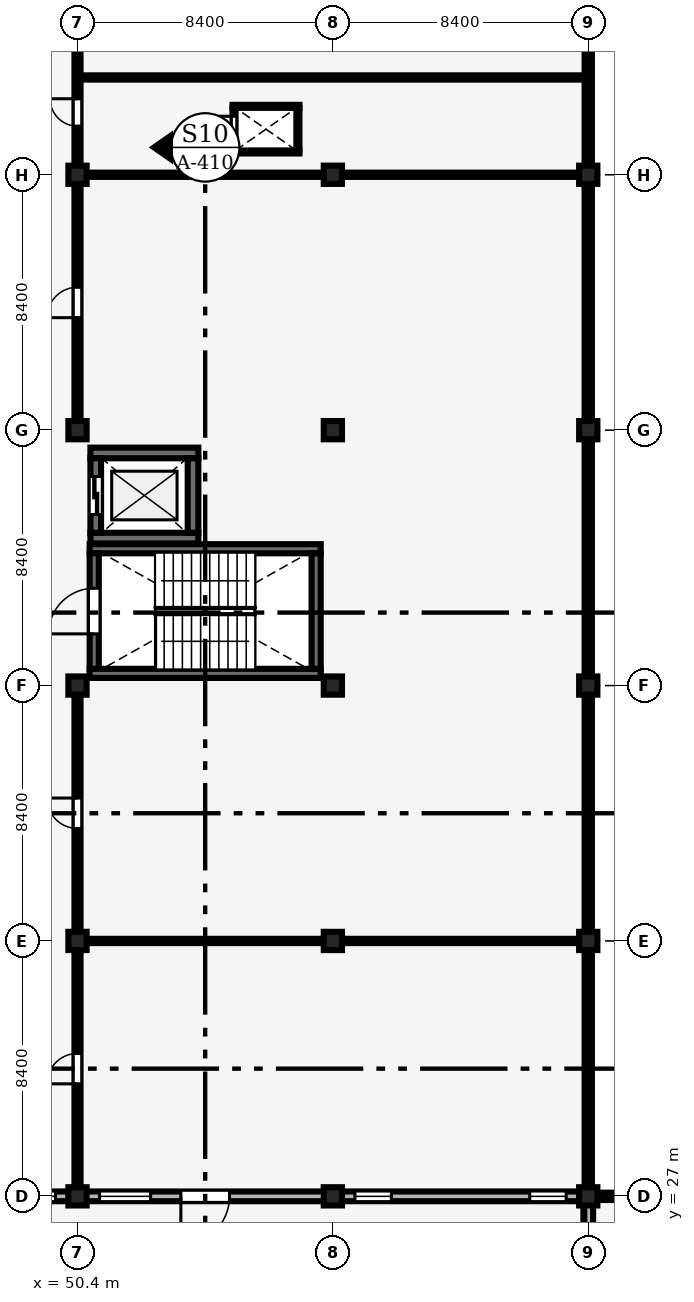
"""IFC4 building model, lengths in metres.
Left out: names, types, materials, properties, quantities, classifications, styles, units other than length and angle.
Written with IfcOpenShell. Run it as: python <this file> out.ifc"""

import sys

from ifc_helpers import new_model, si_unit, direction, frame, frame_2d, origin, origin_2d, place, context, subcontext, project, spatial, rectangle, extrude, element, fill, save


model = new_model("IFC4")
c1 = context("Model", 3, precision=1e-05, world=origin(), true_north=direction((0.0, 1.0)))
c2 = subcontext(c1, "Body", "Model", "MODEL_VIEW")
j1 = project(units=[si_unit("LENGTHUNIT", "METRE"), si_unit("PLANEANGLEUNIT", "RADIAN")], contexts=[c1])
p1 = place(None, origin())
s1 = spatial("IfcSite", under=j1, at=p1, CompositionType="ELEMENT")
p2 = place(p1, origin())
s2 = spatial("IfcBuilding", under=s1, at=p2, CompositionType="ELEMENT")
p3 = place(p2, frame((0.0, 0.0, 4.8)))
s3 = spatial("IfcBuildingStorey", under=s2, at=p3, CompositionType="ELEMENT", Elevation=4.8)
for number, where, z_axis, x_axis in (
    (1, (50.4, 27.0, 0.0), (0.0, 0.0, 1.0), (1.0, 0.0, 0.0)),
    (2, (50.4, 35.4, 0.0), (0.0, 0.0, 1.0), (1.0, 0.0, 0.0)),
    (3, (50.4, 43.8, 0.0), (0.0, 0.0, 1.0), (1.0, 0.0, 0.0)),
    (4, (50.4, 52.2, 0.0), (0.0, 0.0, 1.0), (1.0, 0.0, 0.0)),
    (5, (50.4, 60.6, 0.0), (0.0, 0.0, 1.0), (1.0, 0.0, 0.0)),
    (6, (58.8, 27.0, 0.0), (0.0, 0.0, 1.0), (1.0, 0.0, 0.0)),
    (7, (58.8, 35.4, 0.0), (0.0, 0.0, 1.0), (1.0, 0.0, 0.0)),
    (8, (58.8, 43.8, 0.0), (0.0, 0.0, 1.0), (1.0, 0.0, 0.0)),
    (9, (58.8, 52.2, 0.0), (0.0, 0.0, 1.0), (1.0, 0.0, 0.0)),
    (10, (58.8, 60.6, 0.0), (0.0, 0.0, 1.0), (1.0, 0.0, 0.0)),
    (11, (67.2, 27.0, 0.0), (0.0, 0.0, 1.0), (1.0, 0.0, 0.0)),
    (12, (67.2, 35.4, 0.0), (0.0, 0.0, 1.0), (1.0, 0.0, 0.0)),
    (13, (67.2, 43.8, 0.0), (0.0, 0.0, 1.0), (1.0, 0.0, 0.0)),
    (14, (67.2, 52.2, 0.0), (0.0, 0.0, 1.0), (1.0, 0.0, 0.0)),
    (15, (67.2, 60.6, 0.0), (0.0, 0.0, 1.0), (1.0, 0.0, 0.0)),
):
    element("IfcColumn", number, at=place(p3, frame(where, z_axis=z_axis, x_axis=x_axis)), inside=s3, PredefinedType="COLUMN", context=c2, shape_type="SweptSolid", body=[
        extrude(rectangle(XDim=0.6, YDim=0.6, at=origin_2d()), origin(), (0.0, 0.0, 1.0), 4.2),
    ])
p4 = place(p3, frame((42.275, 27.0, 0.0), z_axis=(0.0, 0.0, 1.0), x_axis=(1.0, 0.0, 0.0)))
e16 = element("IfcWall", 16, at=p4, inside=s3, PredefinedType="SOLIDWALL", context=c2, shape_type="SweptSolid", body=[
    extrude(rectangle(XDim=7.85, YDim=0.32, at=frame_2d((3.925, 0.0))), origin(), (0.0, 0.0, 1.0), 3.13),
])
p5 = place(p4, frame((0.45, 0.0, 0.9)))
e17 = element("IfcOpeningElement", 17, at=p5, cuts=e16, PredefinedType="OPENING", context=c2, shape_type="SweptSolid", body=[
    extrude(rectangle(XDim=1.2, YDim=1.5, at=frame_2d((0.6, 0.75))), frame((0.0, 0.17, 0.0), z_axis=(0.0, -1.0, 0.0), x_axis=(1.0, 0.0, 0.0)), (0.0, 0.0, 1.0), 0.34),
])
p6 = place(p4, frame((6.2, 0.0, 0.9)))
e18 = element("IfcOpeningElement", 18, at=p6, cuts=e16, PredefinedType="OPENING", context=c2, shape_type="SweptSolid", body=[
    extrude(rectangle(XDim=1.2, YDim=1.8, at=frame_2d((0.6, 0.9))), frame((0.0, 0.17, 0.0), z_axis=(0.0, -1.0, 0.0), x_axis=(1.0, 0.0, 0.0)), (0.0, 0.0, 1.0), 0.34),
])
p7 = place(p3, frame((50.675, 27.0, 0.0), z_axis=(0.0, 0.0, 1.0), x_axis=(1.0, 0.0, 0.0)))
e19 = element("IfcWall", 19, at=p7, inside=s3, PredefinedType="SOLIDWALL", context=c2, shape_type="SweptSolid", body=[
    extrude(rectangle(XDim=7.85, YDim=0.32, at=frame_2d((3.925, 0.0))), origin(), (0.0, 0.0, 1.0), 3.08),
])
p8 = place(p7, frame((4.725, 0.0, 0.0), z_axis=(0.0, 0.0, 1.0), x_axis=(-1.0, 0.0, 0.0)))
e20 = element("IfcOpeningElement", 20, at=p8, cuts=e19, PredefinedType="OPENING", context=c2, shape_type="SweptSolid", body=[
    extrude(rectangle(XDim=1.6, YDim=2.3, at=frame_2d((0.8, 1.15))), frame((0.0, 0.17, 0.0), z_axis=(0.0, -1.0, 0.0), x_axis=(1.0, 0.0, 0.0)), (0.0, 0.0, 1.0), 0.34),
])
p9 = place(p7, frame((0.45, 0.0, 0.95)))
e21 = element("IfcOpeningElement", 21, at=p9, cuts=e19, PredefinedType="OPENING", context=c2, shape_type="SweptSolid", body=[
    extrude(rectangle(XDim=1.68, YDim=1.8, at=frame_2d((0.84, 0.9))), frame((0.0, 0.17, 0.0), z_axis=(0.0, -1.0, 0.0), x_axis=(1.0, 0.0, 0.0)), (0.0, 0.0, 1.0), 0.34),
])
p10 = place(p3, frame((59.075, 27.0, 0.0), z_axis=(0.0, 0.0, 1.0), x_axis=(1.0, 0.0, 0.0)))
e22 = element("IfcWall", 22, at=p10, inside=s3, PredefinedType="SOLIDWALL", context=c2, shape_type="SweptSolid", body=[
    extrude(rectangle(XDim=7.85, YDim=0.32, at=frame_2d((3.925, 0.0))), origin(), (0.0, 0.0, 1.0), 3.13),
])
p11 = place(p10, frame((0.45, 0.0, 0.9)))
e23 = element("IfcOpeningElement", 23, at=p11, cuts=e22, PredefinedType="OPENING", context=c2, shape_type="SweptSolid", body=[
    extrude(rectangle(XDim=1.2, YDim=1.5, at=frame_2d((0.6, 0.75))), frame((0.0, 0.17, 0.0), z_axis=(0.0, -1.0, 0.0), x_axis=(1.0, 0.0, 0.0)), (0.0, 0.0, 1.0), 0.34),
])
p12 = place(p10, frame((6.2, 0.0, 0.9)))
e24 = element("IfcOpeningElement", 24, at=p12, cuts=e22, PredefinedType="OPENING", context=c2, shape_type="SweptSolid", body=[
    extrude(rectangle(XDim=1.2, YDim=1.8, at=frame_2d((0.6, 0.9))), frame((0.0, 0.17, 0.0), z_axis=(0.0, -1.0, 0.0), x_axis=(1.0, 0.0, 0.0)), (0.0, 0.0, 1.0), 0.34),
])
p13 = place(p3, frame((67.2, 18.275, 0.0), z_axis=(0.0, 0.0, 1.0), x_axis=(0.0, 1.0, 0.0)))
e25 = element("IfcWall", 25, at=p13, inside=s3, PredefinedType="SOLIDWALL", context=c2, shape_type="SweptSolid", body=[
    extrude(rectangle(XDim=8.45, YDim=0.32, at=frame_2d((4.225, 0.0))), origin(), (0.0, 0.0, 1.0), 3.43),
])
p14 = place(p13, frame((3.025, 0.0, 0.9)))
e26 = element("IfcOpeningElement", 26, at=p14, cuts=e25, PredefinedType="OPENING", context=c2, shape_type="SweptSolid", body=[
    extrude(rectangle(XDim=2.4, YDim=1.8, at=frame_2d((1.2, 0.9))), frame((0.0, 0.17, 0.0), z_axis=(0.0, -1.0, 0.0), x_axis=(1.0, 0.0, 0.0)), (0.0, 0.0, 1.0), 0.34),
])
p15 = place(p3, frame((67.2, 27.275, 0.0), z_axis=(0.0, 0.0, 1.0), x_axis=(0.0, 1.0, 0.0)))
e27 = element("IfcWall", 27, at=p15, inside=s3, PredefinedType="SOLIDWALL", context=c2, shape_type="SweptSolid", body=[
    extrude(rectangle(XDim=7.85, YDim=0.24, at=frame_2d((3.925, 0.0))), origin(), (0.0, 0.0, 1.0), 1.15),
])
p16 = place(p3, frame((67.2, 35.675, 0.0), z_axis=(0.0, 0.0, 1.0), x_axis=(0.0, 1.0, 0.0)))
e28 = element("IfcWall", 28, at=p16, inside=s3, PredefinedType="SOLIDWALL", context=c2, shape_type="SweptSolid", body=[
    extrude(rectangle(XDim=7.85, YDim=0.24, at=frame_2d((3.925, 0.0))), origin(), (0.0, 0.0, 1.0), 1.15),
])
p17 = place(p3, frame((67.2, 44.075, 0.0), z_axis=(0.0, 0.0, 1.0), x_axis=(0.0, 1.0, 0.0)))
e29 = element("IfcWall", 29, at=p17, inside=s3, PredefinedType="SOLIDWALL", context=c2, shape_type="SweptSolid", body=[
    extrude(rectangle(XDim=7.85, YDim=0.24, at=frame_2d((3.925, 0.0))), origin(), (0.0, 0.0, 1.0), 1.15),
])
p18 = place(p3, frame((67.2, 52.475, 0.0), z_axis=(0.0, 0.0, 1.0), x_axis=(0.0, 1.0, 0.0)))
e30 = element("IfcWall", 30, at=p18, inside=s3, PredefinedType="SOLIDWALL", context=c2, shape_type="SweptSolid", body=[
    extrude(rectangle(XDim=7.85, YDim=0.24, at=frame_2d((3.925, 0.0))), origin(), (0.0, 0.0, 1.0), 1.15),
])
p19 = place(p3, frame((67.2, 60.875, 0.0), z_axis=(0.0, 0.0, 1.0), x_axis=(0.0, 1.0, 0.0)))
e31 = element("IfcWall", 31, at=p19, inside=s3, PredefinedType="SOLIDWALL", context=c2, shape_type="SweptSolid", body=[
    extrude(rectangle(XDim=7.85, YDim=0.24, at=frame_2d((3.925, 0.0))), origin(), (0.0, 0.0, 1.0), 1.15),
])
p20 = place(p3, frame((67.475, 27.0, 0.0), z_axis=(0.0, 0.0, 1.0), x_axis=(1.0, 0.0, 0.0)))
e32 = element("IfcWall", 32, at=p20, inside=s3, PredefinedType="SOLIDWALL", context=c2, shape_type="SweptSolid", body=[
    extrude(rectangle(XDim=7.921, YDim=0.24, at=frame_2d((3.961, 0.0))), origin(), (0.0, 0.0, 1.0), 1.1),
])
for number, where, z_axis, x_axis in (
    (33, (50.8, 44.2, 0.0), (0.0, 0.0, 1.0), (1.0, 0.0, 0.0)),
    (34, (50.8, 48.3, 0.0), (0.0, 0.0, 1.0), (1.0, 0.0, 0.0)),
):
    element("IfcWall", number, at=place(p3, frame(where, z_axis=z_axis, x_axis=x_axis)), inside=s3, PredefinedType="SHEAR", context=c2, shape_type="SweptSolid", body=[
        extrude(rectangle(XDim=7.6, YDim=0.3, at=frame_2d((3.8, 0.0))), origin(), (0.0, 0.0, 1.0), 4.025),
    ])
p21 = place(p3, frame((50.95, 44.35, 0.0), z_axis=(0.0, 0.0, 1.0), x_axis=(0.0, 1.0, 0.0)))
e35 = element("IfcWall", 35, at=p21, inside=s3, PredefinedType="SHEAR", context=c2, shape_type="SweptSolid", body=[
    extrude(rectangle(XDim=3.8, YDim=0.3, at=frame_2d((1.9, 0.0))), origin(), (0.0, 0.0, 1.0), 4.025),
])
p22 = place(p21, frame((1.15, 0.0, 0.0)))
e36 = element("IfcOpeningElement", 36, at=p22, cuts=e35, PredefinedType="OPENING", context=c2, shape_type="SweptSolid", body=[
    extrude(rectangle(XDim=1.5, YDim=2.2, at=frame_2d((0.75, 1.1))), frame((0.0, 0.16, 0.0), z_axis=(0.0, -1.0, 0.0), x_axis=(1.0, 0.0, 0.0)), (0.0, 0.0, 1.0), 0.32),
])
p23 = place(p3, frame((58.25, 44.35, 0.0), z_axis=(0.0, 0.0, 1.0), x_axis=(0.0, 1.0, 0.0)))
e37 = element("IfcWall", 37, at=p23, inside=s3, PredefinedType="SHEAR", context=c2, shape_type="SweptSolid", body=[
    extrude(rectangle(XDim=3.8, YDim=0.3, at=frame_2d((1.9, 0.0))), origin(), (0.0, 0.0, 1.0), 4.025),
])
for number, where, z_axis, x_axis in (
    (38, (50.825, 48.65, 0.0), (0.0, 0.0, 1.0), (1.0, 0.0, 0.0)),
    (39, (50.825, 51.45, 0.0), (0.0, 0.0, 1.0), (1.0, 0.0, 0.0)),
):
    element("IfcWall", number, at=place(p3, frame(where, z_axis=z_axis, x_axis=x_axis)), inside=s3, PredefinedType="SHEAR", context=c2, shape_type="SweptSolid", body=[
        extrude(rectangle(XDim=3.55, YDim=0.35, at=frame_2d((1.775, 0.0))), origin(), (0.0, 0.0, 1.0), 3.92),
    ])
p24 = place(p3, frame((51.0, 48.825, 0.0), z_axis=(0.0, 0.0, 1.0), x_axis=(0.0, 1.0, 0.0)))
e40 = element("IfcWall", 40, at=p24, inside=s3, PredefinedType="SHEAR", context=c2, shape_type="SweptSolid", body=[
    extrude(rectangle(XDim=2.45, YDim=0.35, at=frame_2d((1.225, 0.0))), origin(), (0.0, 0.0, 1.0), 3.92),
])
p25 = place(p24, frame((0.6, 0.0, 0.0)))
e41 = element("IfcOpeningElement", 41, at=p25, cuts=e40, PredefinedType="OPENING", context=c2, shape_type="SweptSolid", body=[
    extrude(rectangle(XDim=1.25, YDim=2.25, at=frame_2d((0.625, 1.125))), frame((0.0, 0.185, 0.0), z_axis=(0.0, -1.0, 0.0), x_axis=(1.0, 0.0, 0.0)), (0.0, 0.0, 1.0), 0.37),
])
p26 = place(p3, frame((54.2, 48.825, 0.0), z_axis=(0.0, 0.0, 1.0), x_axis=(0.0, 1.0, 0.0)))
e42 = element("IfcWall", 42, at=p26, inside=s3, PredefinedType="SHEAR", context=c2, shape_type="SweptSolid", body=[
    extrude(rectangle(XDim=2.45, YDim=0.35, at=frame_2d((1.225, 0.0))), origin(), (0.0, 0.0, 1.0), 3.92),
])
for number, where, z_axis, x_axis in (
    (43, (55.5, 61.35, 0.0), (0.0, 0.0, 1.0), (1.0, 0.0, 0.0)),
    (44, (55.5, 62.85, 0.0), (0.0, 0.0, 1.0), (1.0, 0.0, 0.0)),
):
    element("IfcWall", number, at=place(p3, frame(where, z_axis=z_axis, x_axis=x_axis)), inside=s3, PredefinedType="PARTITIONING", context=c2, shape_type="SweptSolid", body=[
        extrude(rectangle(XDim=2.2, YDim=0.1, at=frame_2d((1.1, 0.0))), origin(), (0.0, 0.0, 1.0), 3.9),
    ])
p27 = place(p3, frame((55.55, 61.4, 0.0), z_axis=(0.0, 0.0, 1.0), x_axis=(0.0, 1.0, 0.0)))
e45 = element("IfcWall", 45, at=p27, inside=s3, PredefinedType="PARTITIONING", context=c2, shape_type="SweptSolid", body=[
    extrude(rectangle(XDim=1.4, YDim=0.1, at=frame_2d((0.7, 0.0))), origin(), (0.0, 0.0, 1.0), 3.9),
])
p28 = place(p27, frame((0.275, 0.0, 0.0)))
e46 = element("IfcOpeningElement", 46, at=p28, cuts=e45, PredefinedType="OPENING", context=c2, shape_type="SweptSolid", body=[
    extrude(rectangle(XDim=0.85, YDim=2.05, at=frame_2d((0.425, 1.025))), frame((0.0, 0.06, 0.0), z_axis=(0.0, -1.0, 0.0), x_axis=(1.0, 0.0, 0.0)), (0.0, 0.0, 1.0), 0.12),
])
p29 = place(p3, frame((57.65, 61.4, 0.0), z_axis=(0.0, 0.0, 1.0), x_axis=(0.0, 1.0, 0.0)))
e47 = element("IfcWall", 47, at=p29, inside=s3, PredefinedType="PARTITIONING", context=c2, shape_type="SweptSolid", body=[
    extrude(rectangle(XDim=1.4, YDim=0.1, at=frame_2d((0.7, 0.0))), origin(), (0.0, 0.0, 1.0), 3.9),
])
p30 = place(p3, frame((50.505, 35.4, 0.0), z_axis=(0.0, 0.0, 1.0), x_axis=(1.0, 0.0, 0.0)))
e48 = element("IfcWall", 48, at=p30, inside=s3, PredefinedType="PARTITIONING", context=c2, shape_type="SweptSolid", body=[
    extrude(rectangle(XDim=7.985, YDim=0.14, at=frame_2d((3.993, 0.0))), origin(), (0.0, 0.0, 1.0), 3.18),
])
p31 = place(p3, frame((59.11, 35.4, 0.0), z_axis=(0.0, 0.0, 1.0), x_axis=(1.0, 0.0, 0.0)))
e49 = element("IfcWall", 49, at=p31, inside=s3, PredefinedType="PARTITIONING", context=c2, shape_type="SweptSolid", body=[
    extrude(rectangle(XDim=7.965, YDim=0.14, at=frame_2d((3.982, 0.0))), origin(), (0.0, 0.0, 1.0), 3.23),
])
p32 = place(p3, frame((50.4, 27.165, 0.0), z_axis=(0.0, 0.0, 1.0), x_axis=(0.0, 1.0, 0.0)))
e50 = element("IfcWall", 50, at=p32, inside=s3, PredefinedType="PARTITIONING", context=c2, shape_type="SweptSolid", body=[
    extrude(rectangle(XDim=7.925, YDim=0.2, at=frame_2d((3.962, 0.0))), origin(), (0.0, 0.0, 1.0), 3.03),
])
p33 = place(p32, frame((3.535, 0.0, 0.0)))
e51 = element("IfcOpeningElement", 51, at=p33, cuts=e50, PredefinedType="OPENING", context=c2, shape_type="SweptSolid", body=[
    extrude(rectangle(XDim=1.0, YDim=2.15, at=frame_2d((0.5, 1.075))), frame((0.0, 0.11, 0.0), z_axis=(0.0, -1.0, 0.0), x_axis=(1.0, 0.0, 0.0)), (0.0, 0.0, 1.0), 0.22),
])
p34 = place(p3, frame((50.4, 35.71, 0.0), z_axis=(0.0, 0.0, 1.0), x_axis=(0.0, 1.0, 0.0)))
e52 = element("IfcWall", 52, at=p34, inside=s3, PredefinedType="PARTITIONING", context=c2, shape_type="SweptSolid", body=[
    extrude(rectangle(XDim=7.78, YDim=0.2, at=frame_2d((3.89, 0.0))), origin(), (0.0, 0.0, 1.0), 3.11),
])
p35 = place(p34, frame((3.39, 0.0, 0.0)))
e53 = element("IfcOpeningElement", 53, at=p35, cuts=e52, PredefinedType="OPENING", context=c2, shape_type="SweptSolid", body=[
    extrude(rectangle(XDim=1.0, YDim=2.15, at=frame_2d((0.5, 1.075))), frame((0.0, 0.11, 0.0), z_axis=(0.0, -1.0, 0.0), x_axis=(1.0, 0.0, 0.0)), (0.0, 0.0, 1.0), 0.22),
])
p36 = place(p3, frame((50.505, 60.6, 0.0), z_axis=(0.0, 0.0, 1.0), x_axis=(1.0, 0.0, 0.0)))
e54 = element("IfcWall", 54, at=p36, inside=s3, PredefinedType="PARTITIONING", context=c2, shape_type="SweptSolid", body=[
    extrude(rectangle(XDim=7.985, YDim=0.14, at=frame_2d((3.993, 0.0))), origin(), (0.0, 0.0, 1.0), 3.06),
])
p37 = place(p3, frame((59.11, 60.6, 0.0), z_axis=(0.0, 0.0, 1.0), x_axis=(1.0, 0.0, 0.0)))
e55 = element("IfcWall", 55, at=p37, inside=s3, PredefinedType="PARTITIONING", context=c2, shape_type="SweptSolid", body=[
    extrude(rectangle(XDim=7.965, YDim=0.14, at=frame_2d((3.982, 0.0))), origin(), (0.0, 0.0, 1.0), 3.01),
])
p38 = place(p3, frame((50.505, 63.8, 0.0), z_axis=(0.0, 0.0, 1.0), x_axis=(1.0, 0.0, 0.0)))
e56 = element("IfcWall", 56, at=p38, inside=s3, PredefinedType="PARTITIONING", context=c2, shape_type="SweptSolid", body=[
    extrude(rectangle(XDim=16.57, YDim=0.14, at=frame_2d((8.285, 0.0))), origin(), (0.0, 0.0, 1.0), 3.51),
])
p39 = place(p3, frame((50.4, 52.51, 0.0), z_axis=(0.0, 0.0, 1.0), x_axis=(0.0, 1.0, 0.0)))
e57 = element("IfcWall", 57, at=p39, inside=s3, PredefinedType="PARTITIONING", context=c2, shape_type="SweptSolid", body=[
    extrude(rectangle(XDim=7.78, YDim=0.2, at=frame_2d((3.89, 0.0))), origin(), (0.0, 0.0, 1.0), 3.01),
])
p40 = place(p39, frame((3.39, 0.0, 0.0)))
e58 = element("IfcOpeningElement", 58, at=p40, cuts=e57, PredefinedType="OPENING", context=c2, shape_type="SweptSolid", body=[
    extrude(rectangle(XDim=1.0, YDim=2.15, at=frame_2d((0.5, 1.075))), frame((0.0, 0.11, 0.0), z_axis=(0.0, -1.0, 0.0), x_axis=(1.0, 0.0, 0.0)), (0.0, 0.0, 1.0), 0.22),
])
p41 = place(p3, frame((50.4, 60.91, 0.0), z_axis=(0.0, 0.0, 1.0), x_axis=(0.0, 1.0, 0.0)))
e59 = element("IfcWall", 59, at=p41, inside=s3, PredefinedType="PARTITIONING", context=c2, shape_type="SweptSolid", body=[
    extrude(rectangle(XDim=7.78, YDim=0.2, at=frame_2d((3.89, 0.0))), origin(), (0.0, 0.0, 1.0), 3.01),
])
p42 = place(p41, frame((1.29, 0.0, 0.0)))
e60 = element("IfcOpeningElement", 60, at=p42, cuts=e59, PredefinedType="OPENING", context=c2, shape_type="SweptSolid", body=[
    extrude(rectangle(XDim=0.9, YDim=2.1, at=frame_2d((0.45, 1.05))), frame((0.0, 0.11, 0.0), z_axis=(0.0, -1.0, 0.0), x_axis=(1.0, 0.0, 0.0)), (0.0, 0.0, 1.0), 0.22),
])
p43 = place(p6, origin())
e61 = element("IfcWindow", 61, at=p43, inside=s3, PartitioningType="SINGLE_PANEL", PredefinedType="WINDOW", context=c2, shape_type="SweptSolid", body=[
    extrude(rectangle(XDim=1.2, YDim=1.8, at=frame_2d((0.6, 0.9))), frame((0.0, 0.03, 0.0), z_axis=(0.0, -1.0, 0.0), x_axis=(1.0, 0.0, 0.0)), (0.0, 0.0, 1.0), 0.06),
])
fill(e18, e61)
p44 = place(p8, origin())
e62 = element("IfcDoor", 62, at=p44, inside=s3, OperationType="DOUBLE_DOOR_SINGLE_SWING", PredefinedType="DOOR", context=c2, shape_type="SweptSolid", body=[
    extrude(rectangle(XDim=1.6, YDim=2.3, at=frame_2d((0.8, 1.15))), frame((0.0, 0.025, 0.0), z_axis=(0.0, -1.0, 0.0), x_axis=(1.0, 0.0, 0.0)), (0.0, 0.0, 1.0), 0.05),
])
fill(e20, e62)
p45 = place(p9, origin())
e63 = element("IfcWindow", 63, at=p45, inside=s3, PartitioningType="SINGLE_PANEL", PredefinedType="WINDOW", context=c2, shape_type="SweptSolid", body=[
    extrude(rectangle(XDim=1.68, YDim=1.8, at=frame_2d((0.84, 0.9))), frame((0.0, 0.03, 0.0), z_axis=(0.0, -1.0, 0.0), x_axis=(1.0, 0.0, 0.0)), (0.0, 0.0, 1.0), 0.06),
])
fill(e21, e63)
p46 = place(p11, origin())
e64 = element("IfcWindow", 64, at=p46, inside=s3, PartitioningType="SINGLE_PANEL", PredefinedType="WINDOW", context=c2, shape_type="SweptSolid", body=[
    extrude(rectangle(XDim=1.2, YDim=1.5, at=frame_2d((0.6, 0.75))), frame((0.0, 0.03, 0.0), z_axis=(0.0, -1.0, 0.0), x_axis=(1.0, 0.0, 0.0)), (0.0, 0.0, 1.0), 0.06),
])
fill(e23, e64)
p47 = place(p12, origin())
e65 = element("IfcWindow", 65, at=p47, inside=s3, PartitioningType="SINGLE_PANEL", PredefinedType="WINDOW", context=c2, shape_type="SweptSolid", body=[
    extrude(rectangle(XDim=1.2, YDim=1.8, at=frame_2d((0.6, 0.9))), frame((0.0, 0.03, 0.0), z_axis=(0.0, -1.0, 0.0), x_axis=(1.0, 0.0, 0.0)), (0.0, 0.0, 1.0), 0.06),
])
fill(e24, e65)
p48 = place(p22, origin())
e66 = element("IfcDoor", 66, at=p48, inside=s3, OperationType="DOUBLE_DOOR_SINGLE_SWING", PredefinedType="DOOR", context=c2, shape_type="SweptSolid", body=[
    extrude(rectangle(XDim=1.5, YDim=2.2, at=frame_2d((0.75, 1.1))), frame((0.0, 0.025, 0.0), z_axis=(0.0, -1.0, 0.0), x_axis=(1.0, 0.0, 0.0)), (0.0, 0.0, 1.0), 0.05),
])
fill(e36, e66)
p49 = place(p25, origin())
e67 = element("IfcDoor", 67, at=p49, inside=s3, OperationType="DOUBLE_DOOR_SLIDING", PredefinedType="DOOR", context=c2, shape_type="SweptSolid", body=[
    extrude(rectangle(XDim=1.25, YDim=2.25, at=frame_2d((0.625, 1.125))), frame((0.0, 0.025, 0.0), z_axis=(0.0, -1.0, 0.0), x_axis=(1.0, 0.0, 0.0)), (0.0, 0.0, 1.0), 0.05),
])
fill(e41, e67)
p50 = place(p28, origin())
e68 = element("IfcDoor", 68, at=p50, inside=s3, OperationType="SINGLE_SWING_RIGHT", PredefinedType="DOOR", context=c2, shape_type="SweptSolid", body=[
    extrude(rectangle(XDim=0.85, YDim=2.05, at=frame_2d((0.425, 1.025))), frame((0.0, 0.025, 0.0), z_axis=(0.0, -1.0, 0.0), x_axis=(1.0, 0.0, 0.0)), (0.0, 0.0, 1.0), 0.05),
])
fill(e46, e68)
p51 = place(p33, origin())
e69 = element("IfcDoor", 69, at=p51, inside=s3, OperationType="SINGLE_SWING_LEFT", PredefinedType="DOOR", context=c2, shape_type="SweptSolid", body=[
    extrude(rectangle(XDim=1.0, YDim=2.15, at=frame_2d((0.5, 1.075))), frame((0.0, 0.025, 0.0), z_axis=(0.0, -1.0, 0.0), x_axis=(1.0, 0.0, 0.0)), (0.0, 0.0, 1.0), 0.05),
])
fill(e51, e69)
p52 = place(p35, origin())
e70 = element("IfcDoor", 70, at=p52, inside=s3, OperationType="SINGLE_SWING_RIGHT", PredefinedType="DOOR", context=c2, shape_type="SweptSolid", body=[
    extrude(rectangle(XDim=1.0, YDim=2.15, at=frame_2d((0.5, 1.075))), frame((0.0, 0.025, 0.0), z_axis=(0.0, -1.0, 0.0), x_axis=(1.0, 0.0, 0.0)), (0.0, 0.0, 1.0), 0.05),
])
fill(e53, e70)
p53 = place(p40, origin())
e71 = element("IfcDoor", 71, at=p53, inside=s3, OperationType="SINGLE_SWING_LEFT", PredefinedType="DOOR", context=c2, shape_type="SweptSolid", body=[
    extrude(rectangle(XDim=1.0, YDim=2.15, at=frame_2d((0.5, 1.075))), frame((0.0, 0.025, 0.0), z_axis=(0.0, -1.0, 0.0), x_axis=(1.0, 0.0, 0.0)), (0.0, 0.0, 1.0), 0.05),
])
fill(e58, e71)
p54 = place(p42, origin())
e72 = element("IfcDoor", 72, at=p54, inside=s3, OperationType="SINGLE_SWING_RIGHT", PredefinedType="DOOR", context=c2, shape_type="SweptSolid", body=[
    extrude(rectangle(XDim=0.9, YDim=2.1, at=frame_2d((0.45, 1.05))), frame((0.0, 0.025, 0.0), z_axis=(0.0, -1.0, 0.0), x_axis=(1.0, 0.0, 0.0)), (0.0, 0.0, 1.0), 0.05),
])
fill(e60, e72)
save(model, sys.argv[1])
